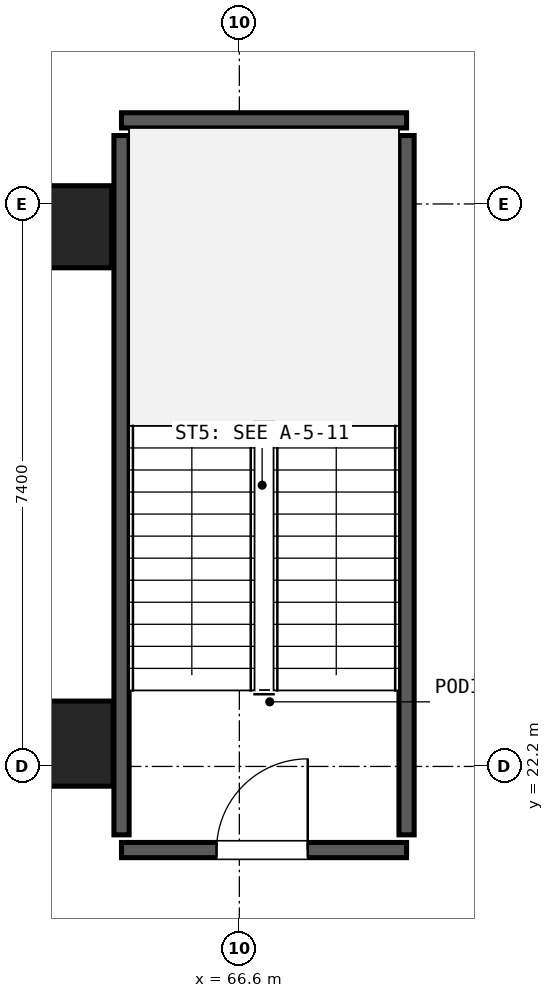
"""IFC4 building model, lengths in metres.
Left out: names, types, materials, properties, quantities, classifications, styles, units other than length and angle.
Written with IfcOpenShell. Run it as: python <this file> out.ifc"""

import sys

from ifc_helpers import new_model, si_unit, direction, frame, frame_2d, origin, origin_2d, place, context, subcontext, project, spatial, rectangle, circle, extrude, element, fill, save


model = new_model("IFC4")
c1 = context("Model", 3, precision=1e-05, world=origin(), true_north=direction((0.0, 1.0)))
c2 = subcontext(c1, "Body", "Model", "MODEL_VIEW")
j1 = project(units=[si_unit("LENGTHUNIT", "METRE"), si_unit("PLANEANGLEUNIT", "RADIAN")], contexts=[c1])
p1 = place(None, origin())
s1 = spatial("IfcSite", under=j1, at=p1, CompositionType="ELEMENT")
p2 = place(p1, origin())
s2 = spatial("IfcBuilding", under=s1, at=p2, CompositionType="ELEMENT")
p3 = place(p2, frame((0.0, 0.0, -4.86)))
s3 = spatial("IfcBuildingStorey", under=s2, at=p3, CompositionType="ELEMENT", Elevation=-4.86)
p4 = place(p3, frame((64.38, 22.5, 0.0), z_axis=(0.0, 0.0, 1.0), x_axis=(1.0, 0.0, 0.0)))
e1 = element("IfcColumn", 1, at=p4, inside=s3, PredefinedType="COLUMN", context=c2, shape_type="SweptSolid", body=[
    extrude(circle(Radius=0.56, at=origin_2d()), origin(), (0.0, 0.0, 1.0), 4.86),
])
p5 = place(p3, frame((64.38, 29.3, 0.0), z_axis=(0.0, 0.0, 1.0), x_axis=(1.0, 0.0, 0.0)))
e2 = element("IfcColumn", 2, at=p5, inside=s3, PredefinedType="COLUMN", context=c2, shape_type="SweptSolid", body=[
    extrude(rectangle(XDim=1.08, YDim=1.08, at=origin_2d()), origin(), (0.0, 0.0, 1.0), 4.86),
])
p6 = place(p3, frame((65.05, 21.1, 0.0), z_axis=(0.0, 0.0, 1.0), x_axis=(1.0, 0.0, 0.0)))
e3 = element("IfcWall", 3, at=p6, inside=s3, PredefinedType="SHEAR", context=c2, shape_type="SweptSolid", body=[
    extrude(rectangle(XDim=3.75, YDim=0.2, at=frame_2d((1.875, 0.0))), origin(), (0.0, 0.0, 1.0), 4.56),
])
p7 = place(p6, frame((1.25, 0.0, 0.0)))
e4 = element("IfcOpeningElement", 4, at=p7, cuts=e3, PredefinedType="OPENING", context=c2, shape_type="SweptSolid", body=[
    extrude(rectangle(XDim=1.2, YDim=2.15, at=frame_2d((0.6, 1.075))), frame((0.0, 0.11, 0.0), z_axis=(0.0, -1.0, 0.0), x_axis=(1.0, 0.0, 0.0)), (0.0, 0.0, 1.0), 0.22),
])
p8 = place(p3, frame((65.05, 30.7, 0.0), z_axis=(0.0, 0.0, 1.0), x_axis=(1.0, 0.0, 0.0)))
e5 = element("IfcWall", 5, at=p8, inside=s3, PredefinedType="SHEAR", context=c2, shape_type="SweptSolid", body=[
    extrude(rectangle(XDim=3.75, YDim=0.2, at=frame_2d((1.875, 0.0))), origin(), (0.0, 0.0, 1.0), 4.56),
])
for number, where, z_axis, x_axis in (
    (6, (65.05, 21.3, 0.0), (0.0, 0.0, 1.0), (0.0, 1.0, 0.0)),
    (7, (68.8, 21.3, 0.0), (0.0, 0.0, 1.0), (0.0, 1.0, 0.0)),
):
    element("IfcWall", number, at=place(p3, frame(where, z_axis=z_axis, x_axis=x_axis)), inside=s3, PredefinedType="SHEAR", context=c2, shape_type="SweptSolid", body=[
        extrude(rectangle(XDim=9.2, YDim=0.2, at=frame_2d((4.6, 0.0))), origin(), (0.0, 0.0, 1.0), 4.56),
    ])
p9 = place(p7, origin())
e8 = element("IfcDoor", 8, at=p9, inside=s3, OperationType="SINGLE_SWING_RIGHT", PredefinedType="DOOR", context=c2, shape_type="SweptSolid", body=[
    extrude(rectangle(XDim=1.2, YDim=2.15, at=frame_2d((0.6, 1.075))), frame((0.0, 0.025, 0.0), z_axis=(0.0, -1.0, 0.0), x_axis=(1.0, 0.0, 0.0)), (0.0, 0.0, 1.0), 0.05),
])
fill(e4, e8)
save(model, sys.argv[1])
